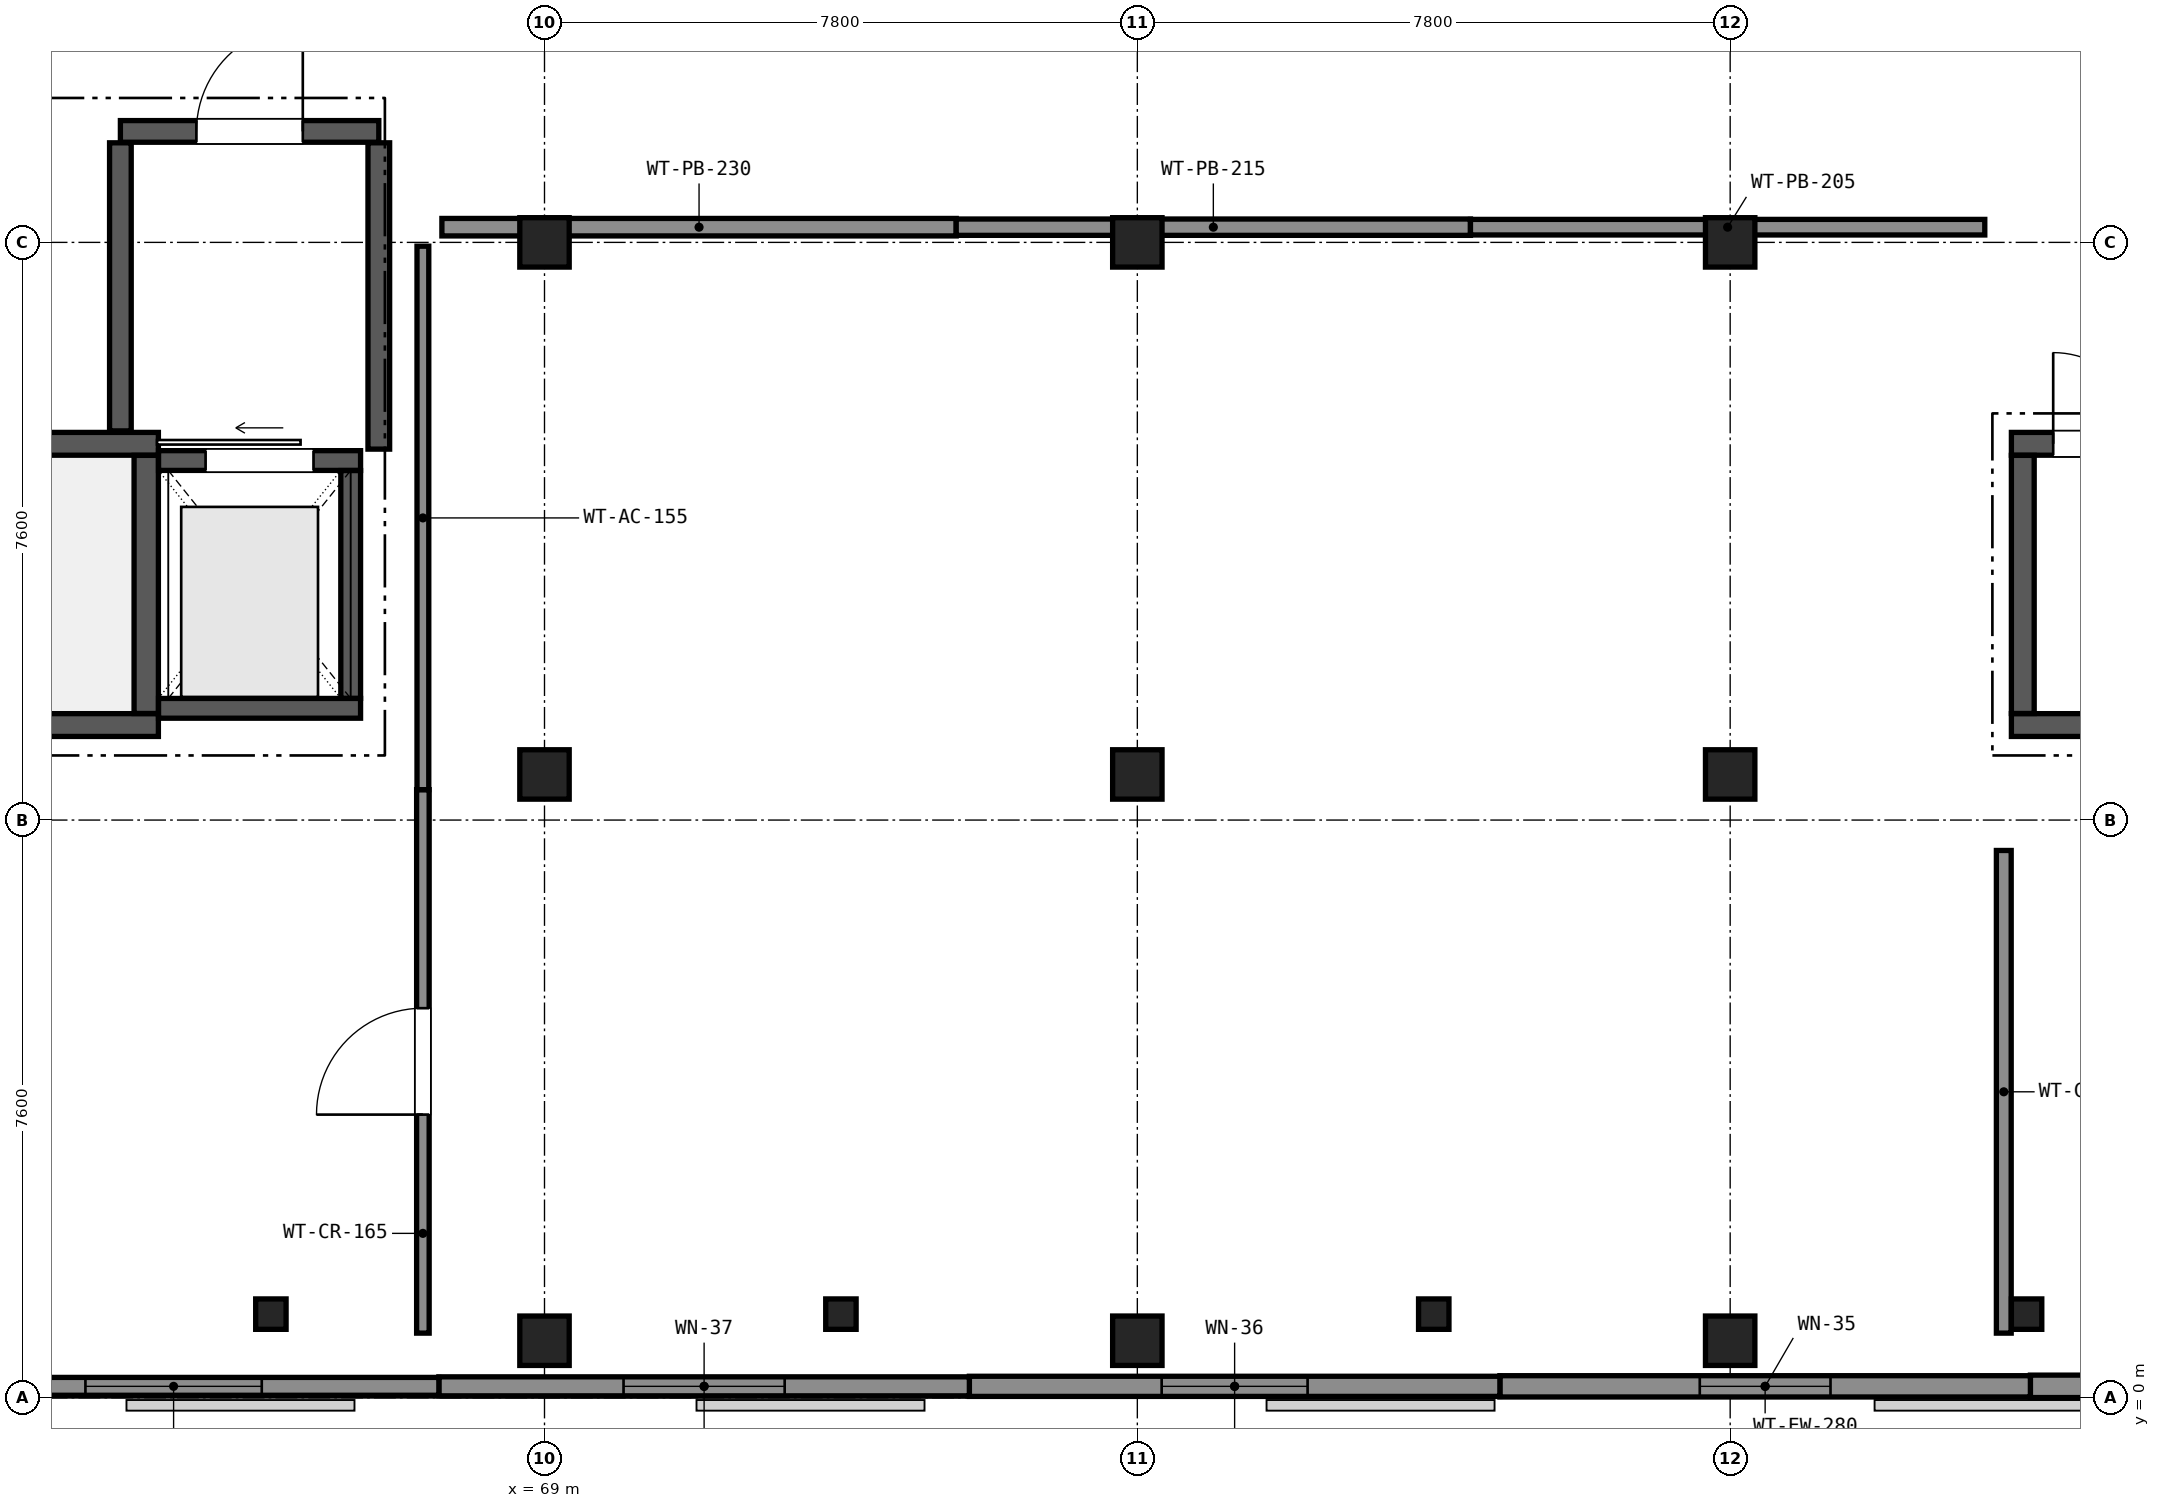
"""IFC4 building model, lengths in metres.
Left out: names, types, materials, properties, quantities, classifications, styles, units other than length and angle.
Written with IfcOpenShell. Run it as: python <this file> out.ifc"""

import sys

from ifc_helpers import new_model, si_unit, direction, frame, frame_2d, origin, origin_2d, place, context, subcontext, project, spatial, rectangle, extrude, element, fill, save


model = new_model("IFC4")
c1 = context("Model", 3, precision=1e-05, world=origin(), true_north=direction((0.0, 1.0)))
c2 = subcontext(c1, "Body", "Model", "MODEL_VIEW")
j1 = project(units=[si_unit("LENGTHUNIT", "METRE"), si_unit("PLANEANGLEUNIT", "RADIAN")], contexts=[c1])
p1 = place(None, origin())
s1 = spatial("IfcSite", under=j1, at=p1, CompositionType="ELEMENT")
p2 = place(p1, origin())
s2 = spatial("IfcBuilding", under=s1, at=p2, CompositionType="ELEMENT")
p3 = place(p2, frame((0.0, 0.0, 5.1)))
s3 = spatial("IfcBuildingStorey", under=s2, at=p3, CompositionType="ELEMENT", Elevation=5.1)
for number, where, z_axis, x_axis in (
    (1, (69.0, 0.75, 0.0), (0.0, 0.0, 1.0), (1.0, 0.0, 0.0)),
    (2, (69.0, 8.2, 0.0), (0.0, 0.0, 1.0), (1.0, 0.0, 0.0)),
    (3, (69.0, 15.2, 0.0), (0.0, 0.0, 1.0), (1.0, 0.0, 0.0)),
    (4, (76.8, 0.75, 0.0), (0.0, 0.0, 1.0), (1.0, 0.0, 0.0)),
    (5, (76.8, 8.2, 0.0), (0.0, 0.0, 1.0), (1.0, 0.0, 0.0)),
    (6, (76.8, 15.2, 0.0), (0.0, 0.0, 1.0), (1.0, 0.0, 0.0)),
    (7, (84.6, 0.75, 0.0), (0.0, 0.0, 1.0), (1.0, 0.0, 0.0)),
    (8, (84.6, 8.2, 0.0), (0.0, 0.0, 1.0), (1.0, 0.0, 0.0)),
    (9, (84.6, 15.2, 0.0), (0.0, 0.0, 1.0), (1.0, 0.0, 0.0)),
):
    element("IfcColumn", number, at=place(p3, frame(where, z_axis=z_axis, x_axis=x_axis)), inside=s3, PredefinedType="COLUMN", context=c2, shape_type="SweptSolid", body=[
        extrude(rectangle(XDim=0.65, YDim=0.65, at=origin_2d()), origin(), (0.0, 0.0, 1.0), 4.42),
    ])
for number, where, z_axis, x_axis in (
    (10, (65.4, 1.1, 0.0), (0.0, 0.0, 1.0), (1.0, 0.0, 0.0)),
    (11, (72.9, 1.1, 0.0), (0.0, 0.0, 1.0), (1.0, 0.0, 0.0)),
    (12, (80.7, 1.1, 0.0), (0.0, 0.0, 1.0), (1.0, 0.0, 0.0)),
    (13, (88.5, 1.1, 0.0), (0.0, 0.0, 1.0), (1.0, 0.0, 0.0)),
):
    element("IfcColumn", number, at=place(p3, frame(where, z_axis=z_axis, x_axis=x_axis)), inside=s3, PredefinedType="PILASTER", context=c2, shape_type="SweptSolid", body=[
        extrude(rectangle(XDim=0.4, YDim=0.4, at=origin_2d()), origin(), (0.0, 0.0, 1.0), 4.42),
    ])
p4 = place(p3, frame((95.53, 0.15, 0.0), z_axis=(0.0, 0.0, 1.0), x_axis=(-1.0, 0.0, 0.0)))
e14 = element("IfcWall", 14, at=p4, inside=s3, PredefinedType="SOLIDWALL", context=c2, shape_type="SweptSolid", body=[
    extrude(rectangle(XDim=6.98, YDim=0.295, at=frame_2d((3.49, 0.0))), origin(), (0.0, 0.0, 1.0), 4.105),
])
p5 = place(p4, frame((2.72, 0.0, 0.9)))
e15 = element("IfcOpeningElement", 15, at=p5, cuts=e14, PredefinedType="OPENING", context=c2, shape_type="SweptSolid", body=[
    extrude(rectangle(XDim=1.54, YDim=1.62, at=frame_2d((0.77, 0.81))), frame((0.0, 0.157, 0.0), z_axis=(0.0, -1.0, 0.0), x_axis=(1.0, 0.0, 0.0)), (0.0, 0.0, 1.0), 0.315),
])
p6 = place(p3, frame((88.55, 0.15, 0.0), z_axis=(0.0, 0.0, 1.0), x_axis=(-1.0, 0.0, 0.0)))
e16 = element("IfcWall", 16, at=p6, inside=s3, PredefinedType="SOLIDWALL", context=c2, shape_type="SweptSolid", body=[
    extrude(rectangle(XDim=6.98, YDim=0.28, at=frame_2d((3.49, 0.0))), origin(), (0.0, 0.0, 1.0), 4.105),
])
p7 = place(p6, frame((2.63, 0.0, 0.9)))
e17 = element("IfcOpeningElement", 17, at=p7, cuts=e16, PredefinedType="OPENING", context=c2, shape_type="SweptSolid", body=[
    extrude(rectangle(XDim=1.72, YDim=1.62, at=frame_2d((0.86, 0.81))), frame((0.0, 0.15, 0.0), z_axis=(0.0, -1.0, 0.0), x_axis=(1.0, 0.0, 0.0)), (0.0, 0.0, 1.0), 0.3),
])
p8 = place(p3, frame((81.57, 0.15, 0.0), z_axis=(0.0, 0.0, 1.0), x_axis=(-1.0, 0.0, 0.0)))
e18 = element("IfcWall", 18, at=p8, inside=s3, PredefinedType="SOLIDWALL", context=c2, shape_type="SweptSolid", body=[
    extrude(rectangle(XDim=6.98, YDim=0.265, at=frame_2d((3.49, 0.0))), origin(), (0.0, 0.0, 1.0), 4.105),
])
p9 = place(p8, frame((2.53, 0.0, 0.9)))
e19 = element("IfcOpeningElement", 19, at=p9, cuts=e18, PredefinedType="OPENING", context=c2, shape_type="SweptSolid", body=[
    extrude(rectangle(XDim=1.92, YDim=1.62, at=frame_2d((0.96, 0.81))), frame((0.0, 0.142, 0.0), z_axis=(0.0, -1.0, 0.0), x_axis=(1.0, 0.0, 0.0)), (0.0, 0.0, 1.0), 0.285),
])
p10 = place(p3, frame((74.59, 0.15, 0.0), z_axis=(0.0, 0.0, 1.0), x_axis=(-1.0, 0.0, 0.0)))
e20 = element("IfcWall", 20, at=p10, inside=s3, PredefinedType="SOLIDWALL", context=c2, shape_type="SweptSolid", body=[
    extrude(rectangle(XDim=6.98, YDim=0.25, at=frame_2d((3.49, 0.0))), origin(), (0.0, 0.0, 1.0), 4.105),
])
p11 = place(p10, frame((2.43, 0.0, 0.9)))
e21 = element("IfcOpeningElement", 21, at=p11, cuts=e20, PredefinedType="OPENING", context=c2, shape_type="SweptSolid", body=[
    extrude(rectangle(XDim=2.12, YDim=1.62, at=frame_2d((1.06, 0.81))), frame((0.0, 0.135, 0.0), z_axis=(0.0, -1.0, 0.0), x_axis=(1.0, 0.0, 0.0)), (0.0, 0.0, 1.0), 0.27),
])
p12 = place(p3, frame((67.61, 0.15, 0.0), z_axis=(0.0, 0.0, 1.0), x_axis=(-1.0, 0.0, 0.0)))
e22 = element("IfcWall", 22, at=p12, inside=s3, PredefinedType="SOLIDWALL", context=c2, shape_type="SweptSolid", body=[
    extrude(rectangle(XDim=6.98, YDim=0.235, at=frame_2d((3.49, 0.0))), origin(), (0.0, 0.0, 1.0), 4.105),
])
p13 = place(p12, frame((2.33, 0.0, 0.9)))
e23 = element("IfcOpeningElement", 23, at=p13, cuts=e22, PredefinedType="OPENING", context=c2, shape_type="SweptSolid", body=[
    extrude(rectangle(XDim=2.32, YDim=1.62, at=frame_2d((1.16, 0.81))), frame((0.0, 0.127, 0.0), z_axis=(0.0, -1.0, 0.0), x_axis=(1.0, 0.0, 0.0)), (0.0, 0.0, 1.0), 0.255),
])
p14 = place(p3, frame((55.5, 8.85, 0.0), z_axis=(0.0, 0.0, 1.0), x_axis=(1.0, 0.0, 0.0)))
e24 = element("IfcWall", 24, at=p14, inside=s3, PredefinedType="SHEAR", context=c2, shape_type="SweptSolid", body=[
    extrude(rectangle(XDim=8.42, YDim=0.3, at=frame_2d((4.21, 0.0))), origin(), (0.0, 0.0, 1.0), 4.105),
])
p15 = place(p3, frame((55.5, 12.55, 0.0), z_axis=(0.0, 0.0, 1.0), x_axis=(1.0, 0.0, 0.0)))
e25 = element("IfcWall", 25, at=p15, inside=s3, PredefinedType="SHEAR", context=c2, shape_type="SweptSolid", body=[
    extrude(rectangle(XDim=8.42, YDim=0.3, at=frame_2d((4.21, 0.0))), origin(), (0.0, 0.0, 1.0), 4.105),
])
p16 = place(p15, frame((0.55, 0.0, 0.0)))
e26 = element("IfcOpeningElement", 26, at=p16, cuts=e25, PredefinedType="OPENING", context=c2, shape_type="SweptSolid", body=[
    extrude(rectangle(XDim=1.2, YDim=2.2, at=frame_2d((0.6, 1.1))), frame((0.0, 0.16, 0.0), z_axis=(0.0, -1.0, 0.0), x_axis=(1.0, 0.0, 0.0)), (0.0, 0.0, 1.0), 0.32),
])
p17 = place(p3, frame((63.76, 9.002, 0.0), z_axis=(0.0, 0.0, 1.0), x_axis=(0.0, 1.0, 0.0)))
e27 = element("IfcWall", 27, at=p17, inside=s3, PredefinedType="SHEAR", context=c2, shape_type="SweptSolid", body=[
    extrude(rectangle(XDim=3.396, YDim=0.32, at=frame_2d((1.698, 0.0))), origin(), (0.0, 0.0, 1.0), 4.105),
])
p18 = place(p3, frame((63.922, 9.07, 0.0), z_axis=(0.0, 0.0, 1.0), x_axis=(1.0, 0.0, 0.0)))
e28 = element("IfcWall", 28, at=p18, inside=s3, PredefinedType="SHEAR", context=c2, shape_type="SweptSolid", body=[
    extrude(rectangle(XDim=2.658, YDim=0.26, at=frame_2d((1.329, 0.0))), origin(), (0.0, 0.0, 1.0), 4.105),
])
p19 = place(p3, frame((63.922, 12.33, 0.0), z_axis=(0.0, 0.0, 1.0), x_axis=(1.0, 0.0, 0.0)))
e29 = element("IfcWall", 29, at=p19, inside=s3, PredefinedType="SHEAR", context=c2, shape_type="SweptSolid", body=[
    extrude(rectangle(XDim=2.658, YDim=0.26, at=frame_2d((1.329, 0.0))), origin(), (0.0, 0.0, 1.0), 4.105),
])
p20 = place(p19, frame((0.619, 0.0, 0.0)))
e30 = element("IfcOpeningElement", 30, at=p20, cuts=e29, PredefinedType="OPENING", context=c2, shape_type="SweptSolid", body=[
    extrude(rectangle(XDim=1.42, YDim=2.25, at=frame_2d((0.71, 1.125))), frame((0.0, 0.14, 0.0), z_axis=(0.0, -1.0, 0.0), x_axis=(1.0, 0.0, 0.0)), (0.0, 0.0, 1.0), 0.28),
])
p21 = place(p3, frame((66.45, 9.202, 0.0), z_axis=(0.0, 0.0, 1.0), x_axis=(0.0, 1.0, 0.0)))
e31 = element("IfcWall", 31, at=p21, inside=s3, PredefinedType="SHEAR", context=c2, shape_type="SweptSolid", body=[
    extrude(rectangle(XDim=2.996, YDim=0.26, at=frame_2d((1.498, 0.0))), origin(), (0.0, 0.0, 1.0), 4.105),
])
p22 = place(p3, frame((63.42, 16.66, 0.0), z_axis=(0.0, 0.0, 1.0), x_axis=(1.0, 0.0, 0.0)))
e32 = element("IfcWall", 32, at=p22, inside=s3, PredefinedType="SHEAR", context=c2, shape_type="SweptSolid", body=[
    extrude(rectangle(XDim=3.4, YDim=0.285, at=frame_2d((1.7, 0.0))), origin(), (0.0, 0.0, 1.0), 4.105),
])
p23 = place(p22, frame((1.0, 0.0, 0.0)))
e33 = element("IfcOpeningElement", 33, at=p23, cuts=e32, PredefinedType="OPENING", context=c2, shape_type="SweptSolid", body=[
    extrude(rectangle(XDim=1.4, YDim=2.25, at=frame_2d((0.7, 1.125))), frame((0.0, 0.152, 0.0), z_axis=(0.0, -1.0, 0.0), x_axis=(1.0, 0.0, 0.0)), (0.0, 0.0, 1.0), 0.305),
])
p24 = place(p3, frame((63.42, 12.72, 0.0), z_axis=(0.0, 0.0, 1.0), x_axis=(0.0, 1.0, 0.0)))
e34 = element("IfcWall", 34, at=p24, inside=s3, PredefinedType="SHEAR", context=c2, shape_type="SweptSolid", body=[
    extrude(rectangle(XDim=3.79, YDim=0.285, at=frame_2d((1.895, 0.0))), origin(), (0.0, 0.0, 1.0), 3.405),
])
p25 = place(p3, frame((66.82, 12.48, 0.0), z_axis=(0.0, 0.0, 1.0), x_axis=(0.0, 1.0, 0.0)))
e35 = element("IfcWall", 35, at=p25, inside=s3, PredefinedType="SHEAR", context=c2, shape_type="SweptSolid", body=[
    extrude(rectangle(XDim=4.03, YDim=0.285, at=frame_2d((2.015, 0.0))), origin(), (0.0, 0.0, 1.0), 3.405),
])
p26 = place(p3, frame((88.3, 8.85, 0.0), z_axis=(0.0, 0.0, 1.0), x_axis=(1.0, 0.0, 0.0)))
e36 = element("IfcWall", 36, at=p26, inside=s3, PredefinedType="SHEAR", context=c2, shape_type="SweptSolid", body=[
    extrude(rectangle(XDim=8.42, YDim=0.3, at=frame_2d((4.21, 0.0))), origin(), (0.0, 0.0, 1.0), 4.105),
])
p27 = place(p3, frame((88.3, 12.55, 0.0), z_axis=(0.0, 0.0, 1.0), x_axis=(1.0, 0.0, 0.0)))
e37 = element("IfcWall", 37, at=p27, inside=s3, PredefinedType="SHEAR", context=c2, shape_type="SweptSolid", body=[
    extrude(rectangle(XDim=8.42, YDim=0.3, at=frame_2d((4.21, 0.0))), origin(), (0.0, 0.0, 1.0), 4.105),
])
p28 = place(p27, frame((0.55, 0.0, 0.0)))
e38 = element("IfcOpeningElement", 38, at=p28, cuts=e37, PredefinedType="OPENING", context=c2, shape_type="SweptSolid", body=[
    extrude(rectangle(XDim=1.2, YDim=2.2, at=frame_2d((0.6, 1.1))), frame((0.0, 0.16, 0.0), z_axis=(0.0, -1.0, 0.0), x_axis=(1.0, 0.0, 0.0)), (0.0, 0.0, 1.0), 0.32),
])
p29 = place(p3, frame((88.45, 9.002, 0.0), z_axis=(0.0, 0.0, 1.0), x_axis=(0.0, 1.0, 0.0)))
e39 = element("IfcWall", 39, at=p29, inside=s3, PredefinedType="SHEAR", context=c2, shape_type="SweptSolid", body=[
    extrude(rectangle(XDim=3.396, YDim=0.3, at=frame_2d((1.698, 0.0))), origin(), (0.0, 0.0, 1.0), 4.105),
])
p30 = place(p3, frame((67.4, 0.85, 0.0), z_axis=(0.0, 0.0, 1.0), x_axis=(0.0, 1.0, 0.0)))
e40 = element("IfcWall", 40, at=p30, inside=s3, PredefinedType="PARTITIONING", context=c2, shape_type="SweptSolid", body=[
    extrude(rectangle(XDim=7.15, YDim=0.165, at=frame_2d((3.575, 0.0))), origin(), (0.0, 0.0, 1.0), 3.0),
])
p31 = place(p30, frame((2.875, 0.0, 0.0)))
e41 = element("IfcOpeningElement", 41, at=p31, cuts=e40, PredefinedType="OPENING", context=c2, shape_type="SweptSolid", body=[
    extrude(rectangle(XDim=1.4, YDim=2.2, at=frame_2d((0.7, 1.1))), frame((0.0, 0.093, 0.0), z_axis=(0.0, -1.0, 0.0), x_axis=(1.0, 0.0, 0.0)), (0.0, 0.0, 1.0), 0.185),
])
p32 = place(p3, frame((67.4, 8.0, 0.0), z_axis=(0.0, 0.0, 1.0), x_axis=(0.0, 1.0, 0.0)))
e42 = element("IfcWall", 42, at=p32, inside=s3, PredefinedType="PARTITIONING", context=c2, shape_type="SweptSolid", body=[
    extrude(rectangle(XDim=7.15, YDim=0.155, at=frame_2d((3.575, 0.0))), origin(), (0.0, 0.0, 1.0), 3.405),
])
p33 = place(p3, frame((67.65, 15.4, 0.0), z_axis=(0.0, 0.0, 1.0), x_axis=(1.0, 0.0, 0.0)))
e43 = element("IfcWall", 43, at=p33, inside=s3, PredefinedType="PARTITIONING", context=c2, shape_type="SweptSolid", body=[
    extrude(rectangle(XDim=6.767, YDim=0.23, at=frame_2d((3.384, 0.0))), origin(), (0.0, 0.0, 1.0), 3.305),
])
p34 = place(p3, frame((74.417, 15.4, 0.0), z_axis=(0.0, 0.0, 1.0), x_axis=(1.0, 0.0, 0.0)))
e44 = element("IfcWall", 44, at=p34, inside=s3, PredefinedType="PARTITIONING", context=c2, shape_type="SweptSolid", body=[
    extrude(rectangle(XDim=6.766, YDim=0.215, at=frame_2d((3.383, 0.0))), origin(), (0.0, 0.0, 1.0), 3.305),
])
p35 = place(p3, frame((81.183, 15.4, 0.0), z_axis=(0.0, 0.0, 1.0), x_axis=(1.0, 0.0, 0.0)))
e45 = element("IfcWall", 45, at=p35, inside=s3, PredefinedType="PARTITIONING", context=c2, shape_type="SweptSolid", body=[
    extrude(rectangle(XDim=6.767, YDim=0.205, at=frame_2d((3.383, 0.0))), origin(), (0.0, 0.0, 1.0), 3.305),
])
p36 = place(p3, frame((88.2, 7.2, 0.0), z_axis=(0.0, 0.0, 1.0), x_axis=(0.0, -1.0, 0.0)))
e46 = element("IfcWall", 46, at=p36, inside=s3, PredefinedType="PARTITIONING", context=c2, shape_type="SweptSolid", body=[
    extrude(rectangle(XDim=6.35, YDim=0.195, at=frame_2d((3.175, 0.0))), origin(), (0.0, 0.0, 1.0), 3.355),
])
p37 = place(p7, origin())
e47 = element("IfcWindow", 47, at=p37, inside=s3, PartitioningType="SINGLE_PANEL", PredefinedType="WINDOW", context=c2, shape_type="SweptSolid", body=[
    extrude(rectangle(XDim=1.72, YDim=1.62, at=frame_2d((0.86, 0.81))), frame((0.0, 0.03, 0.0), z_axis=(0.0, -1.0, 0.0), x_axis=(1.0, 0.0, 0.0)), (0.0, 0.0, 1.0), 0.06),
])
fill(e17, e47)
p38 = place(p9, origin())
e48 = element("IfcWindow", 48, at=p38, inside=s3, PartitioningType="SINGLE_PANEL", PredefinedType="WINDOW", context=c2, shape_type="SweptSolid", body=[
    extrude(rectangle(XDim=1.92, YDim=1.62, at=frame_2d((0.96, 0.81))), frame((0.0, 0.03, 0.0), z_axis=(0.0, -1.0, 0.0), x_axis=(1.0, 0.0, 0.0)), (0.0, 0.0, 1.0), 0.06),
])
fill(e19, e48)
p39 = place(p11, origin())
e49 = element("IfcWindow", 49, at=p39, inside=s3, PartitioningType="SINGLE_PANEL", PredefinedType="WINDOW", context=c2, shape_type="SweptSolid", body=[
    extrude(rectangle(XDim=2.12, YDim=1.62, at=frame_2d((1.06, 0.81))), frame((0.0, 0.03, 0.0), z_axis=(0.0, -1.0, 0.0), x_axis=(1.0, 0.0, 0.0)), (0.0, 0.0, 1.0), 0.06),
])
fill(e21, e49)
p40 = place(p13, origin())
e50 = element("IfcWindow", 50, at=p40, inside=s3, PartitioningType="SINGLE_PANEL", PredefinedType="WINDOW", context=c2, shape_type="SweptSolid", body=[
    extrude(rectangle(XDim=2.32, YDim=1.62, at=frame_2d((1.16, 0.81))), frame((0.0, 0.03, 0.0), z_axis=(0.0, -1.0, 0.0), x_axis=(1.0, 0.0, 0.0)), (0.0, 0.0, 1.0), 0.06),
])
fill(e23, e50)
p41 = place(p20, origin())
e51 = element("IfcDoor", 51, at=p41, inside=s3, OperationType="SLIDING_TO_LEFT", PredefinedType="DOOR", context=c2, shape_type="SweptSolid", body=[
    extrude(rectangle(XDim=1.42, YDim=2.25, at=frame_2d((0.71, 1.125))), frame((0.0, 0.025, 0.0), z_axis=(0.0, -1.0, 0.0), x_axis=(1.0, 0.0, 0.0)), (0.0, 0.0, 1.0), 0.05),
])
fill(e30, e51)
p42 = place(p23, origin())
e52 = element("IfcDoor", 52, at=p42, inside=s3, OperationType="SINGLE_SWING_RIGHT", PredefinedType="DOOR", context=c2, shape_type="SweptSolid", body=[
    extrude(rectangle(XDim=1.4, YDim=2.25, at=frame_2d((0.7, 1.125))), frame((0.0, 0.025, 0.0), z_axis=(0.0, -1.0, 0.0), x_axis=(1.0, 0.0, 0.0)), (0.0, 0.0, 1.0), 0.05),
])
fill(e33, e52)
p43 = place(p28, origin())
e53 = element("IfcDoor", 53, at=p43, inside=s3, OperationType="SINGLE_SWING_LEFT", PredefinedType="DOOR", context=c2, shape_type="SweptSolid", body=[
    extrude(rectangle(XDim=1.2, YDim=2.2, at=frame_2d((0.6, 1.1))), frame((0.0, 0.025, 0.0), z_axis=(0.0, -1.0, 0.0), x_axis=(1.0, 0.0, 0.0)), (0.0, 0.0, 1.0), 0.05),
])
fill(e38, e53)
p44 = place(p31, origin())
e54 = element("IfcDoor", 54, at=p44, inside=s3, OperationType="SINGLE_SWING_LEFT", PredefinedType="DOOR", context=c2, shape_type="SweptSolid", body=[
    extrude(rectangle(XDim=1.4, YDim=2.2, at=frame_2d((0.7, 1.1))), frame((0.0, 0.025, 0.0), z_axis=(0.0, -1.0, 0.0), x_axis=(1.0, 0.0, 0.0)), (0.0, 0.0, 1.0), 0.05),
])
fill(e41, e54)
save(model, sys.argv[1])
